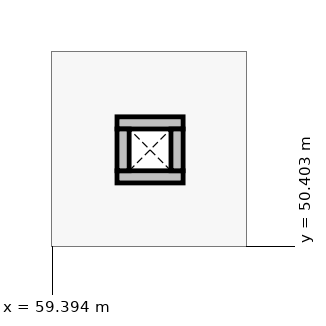
"""IFC4 building model, lengths in metres.
Left out: names, types, materials, properties, quantities, classifications, styles, units other than length and angle.
Written with IfcOpenShell. Run it as: python <this file> out.ifc"""

import sys

from ifc_helpers import new_model, si_unit, direction, frame, frame_2d, origin, place, context, subcontext, project, spatial, rectangle, extrude, element, save


model = new_model("IFC4")
c1 = context("Model", 3, precision=1e-05, world=origin(), true_north=direction((0.0, 1.0)))
c2 = subcontext(c1, "Body", "Model", "MODEL_VIEW")
j1 = project(units=[si_unit("LENGTHUNIT", "METRE"), si_unit("PLANEANGLEUNIT", "RADIAN")], contexts=[c1])
p1 = place(None, origin())
s1 = spatial("IfcSite", under=j1, at=p1, CompositionType="ELEMENT")
p2 = place(p1, origin())
s2 = spatial("IfcBuilding", under=s1, at=p2, CompositionType="ELEMENT")
p3 = place(p2, frame((0.0, 0.0, 4.8)))
s3 = spatial("IfcBuildingStorey", under=s2, at=p3, CompositionType="ELEMENT", Elevation=4.8)
for number, where, z_axis, x_axis in (
    (1, (60.24, 51.32, 0.0), (0.0, 0.0, 1.0), (1.0, 0.0, 0.0)),
    (2, (60.24, 52.03, 0.0), (0.0, 0.0, 1.0), (1.0, 0.0, 0.0)),
):
    element("IfcWall", number, at=place(p3, frame(where, z_axis=z_axis, x_axis=x_axis)), inside=s3, PredefinedType="PARTITIONING", context=c2, shape_type="SweptSolid", body=[
        extrude(rectangle(XDim=0.87, YDim=0.16, at=frame_2d((0.435, 0.0))), origin(), (0.0, 0.0, 1.0), 3.35),
    ])
for number, where, z_axis, x_axis in (
    (3, (60.32, 51.4, 0.0), (0.0, 0.0, 1.0), (0.0, 1.0, 0.0)),
    (4, (61.03, 51.4, 0.0), (0.0, 0.0, 1.0), (0.0, 1.0, 0.0)),
):
    element("IfcWall", number, at=place(p3, frame(where, z_axis=z_axis, x_axis=x_axis)), inside=s3, PredefinedType="PARTITIONING", context=c2, shape_type="SweptSolid", body=[
        extrude(rectangle(XDim=0.55, YDim=0.16, at=frame_2d((0.275, 0.0))), origin(), (0.0, 0.0, 1.0), 3.35),
    ])
save(model, sys.argv[1])
